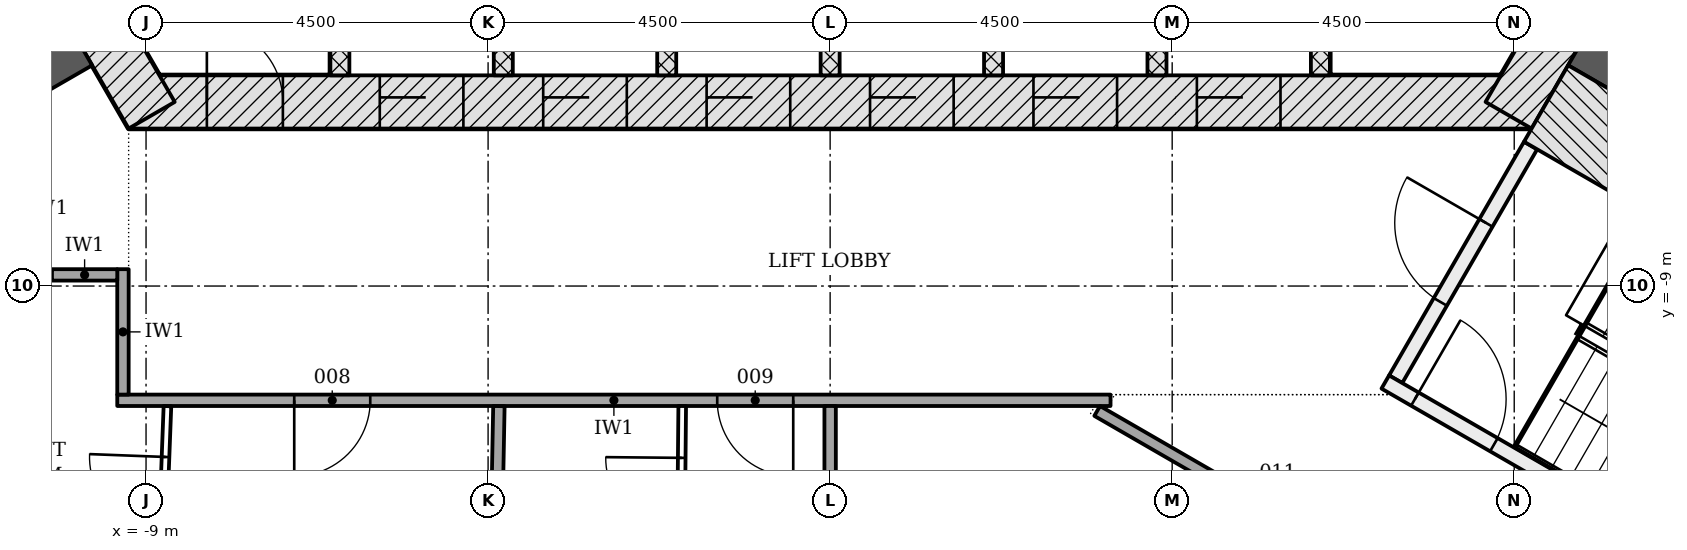
"""IFC4 building model, lengths in metres.
Left out: names, types, materials, properties, quantities, classifications, styles, units other than length and angle.
Written with IfcOpenShell. Run it as: python <this file> out.ifc"""

import sys

from ifc_helpers import new_model, si_unit, direction, frame, frame_2d, origin, place, context, subcontext, project, spatial, rectangle, extrude, element, fill, save


model = new_model("IFC4")
c1 = context("Model", 3, precision=1e-05, world=origin(), true_north=direction((0.0, 1.0)))
c2 = subcontext(c1, "Body", "Model", "MODEL_VIEW")
j1 = project(units=[si_unit("LENGTHUNIT", "METRE"), si_unit("PLANEANGLEUNIT", "RADIAN")], contexts=[c1])
p1 = place(None, origin())
s1 = spatial("IfcSite", under=j1, at=p1, CompositionType="ELEMENT")
p2 = place(p1, origin())
s2 = spatial("IfcBuilding", under=s1, at=p2, CompositionType="ELEMENT")
p3 = place(p2, frame((0.0, 0.0, 45.6)))
s3 = spatial("IfcBuildingStorey", under=s2, at=p3, CompositionType="ELEMENT", Elevation=45.6)
p4 = place(p3, frame((-9.229, -6.578, -0.2), z_axis=(0.0, 0.0, 1.0), x_axis=(1.0, 0.0, 0.0)))
e1 = element("IfcWall", 1, at=p4, inside=s3, PredefinedType="SHEAR", context=c2, shape_type="SweptSolid", body=[
    extrude(rectangle(XDim=18.458, YDim=0.7, at=frame_2d((9.229, 0.0))), origin(), (0.0, 0.0, 1.0), 3.6),
])
p5 = place(p4, frame((3.304, 0.0, 0.2)))
e2 = element("IfcOpeningElement", 2, at=p5, cuts=e1, PredefinedType="OPENING", context=c2, shape_type="SweptSolid", body=[
    extrude(rectangle(XDim=1.1, YDim=2.1, at=frame_2d((0.55, 1.05))), frame((0.0, 0.36, 0.0), z_axis=(0.0, -1.0, 0.0), x_axis=(1.0, 0.0, 0.0)), (0.0, 0.0, 1.0), 0.72),
])
p6 = place(p4, frame((5.454, 0.0, 0.2)))
e3 = element("IfcOpeningElement", 3, at=p6, cuts=e1, PredefinedType="OPENING", context=c2, shape_type="SweptSolid", body=[
    extrude(rectangle(XDim=1.1, YDim=2.1, at=frame_2d((0.55, 1.05))), frame((0.0, 0.36, 0.0), z_axis=(0.0, -1.0, 0.0), x_axis=(1.0, 0.0, 0.0)), (0.0, 0.0, 1.0), 0.72),
])
p7 = place(p4, frame((7.604, 0.0, 0.2)))
e4 = element("IfcOpeningElement", 4, at=p7, cuts=e1, PredefinedType="OPENING", context=c2, shape_type="SweptSolid", body=[
    extrude(rectangle(XDim=1.1, YDim=2.1, at=frame_2d((0.55, 1.05))), frame((0.0, 0.36, 0.0), z_axis=(0.0, -1.0, 0.0), x_axis=(1.0, 0.0, 0.0)), (0.0, 0.0, 1.0), 0.72),
])
p8 = place(p4, frame((9.754, 0.0, 0.2)))
e5 = element("IfcOpeningElement", 5, at=p8, cuts=e1, PredefinedType="OPENING", context=c2, shape_type="SweptSolid", body=[
    extrude(rectangle(XDim=1.1, YDim=2.1, at=frame_2d((0.55, 1.05))), frame((0.0, 0.36, 0.0), z_axis=(0.0, -1.0, 0.0), x_axis=(1.0, 0.0, 0.0)), (0.0, 0.0, 1.0), 0.72),
])
p9 = place(p4, frame((11.904, 0.0, 0.2)))
e6 = element("IfcOpeningElement", 6, at=p9, cuts=e1, PredefinedType="OPENING", context=c2, shape_type="SweptSolid", body=[
    extrude(rectangle(XDim=1.1, YDim=2.1, at=frame_2d((0.55, 1.05))), frame((0.0, 0.36, 0.0), z_axis=(0.0, -1.0, 0.0), x_axis=(1.0, 0.0, 0.0)), (0.0, 0.0, 1.0), 0.72),
])
p10 = place(p4, frame((14.054, 0.0, 0.2)))
e7 = element("IfcOpeningElement", 7, at=p10, cuts=e1, PredefinedType="OPENING", context=c2, shape_type="SweptSolid", body=[
    extrude(rectangle(XDim=1.1, YDim=2.1, at=frame_2d((0.55, 1.05))), frame((0.0, 0.36, 0.0), z_axis=(0.0, -1.0, 0.0), x_axis=(1.0, 0.0, 0.0)), (0.0, 0.0, 1.0), 0.72),
])
p11 = place(p4, frame((1.029, 0.0, 0.2)))
e8 = element("IfcOpeningElement", 8, at=p11, cuts=e1, PredefinedType="OPENING", context=c2, shape_type="SweptSolid", body=[
    extrude(rectangle(XDim=1.0, YDim=2.1, at=frame_2d((0.5, 1.05))), frame((0.0, 0.36, 0.0), z_axis=(0.0, -1.0, 0.0), x_axis=(1.0, 0.0, 0.0)), (0.0, 0.0, 1.0), 0.72),
])
for number, where, z_axis, x_axis in (
    (9, (8.926, -6.753, -0.2), (0.0, 0.0, 1.0), (0.5, 0.866, 0.0)),
    (10, (-10.311, -4.353, -0.2), (0.0, 0.0, 1.0), (0.5, -0.866, 0.0)),
):
    element("IfcWall", number, at=place(p3, frame(where, z_axis=z_axis, x_axis=x_axis)), inside=s3, PredefinedType="SHEAR", context=c2, shape_type="SweptSolid", body=[
        extrude(rectangle(XDim=2.771, YDim=0.7, at=frame_2d((1.386, 0.0))), origin(), (0.0, 0.0, 1.0), 3.6),
    ])
for number, where, z_axis, x_axis in (
    (11, (-9.922, -5.728, -0.2), (0.0, 0.0, 1.0), (-0.866, -0.5, 0.0)),
    (12, (9.922, -5.728, -0.2), (0.0, 0.0, 1.0), (0.866, -0.5, 0.0)),
):
    element("IfcWall", number, at=place(p3, frame(where, z_axis=z_axis, x_axis=x_axis)), inside=s3, PredefinedType="SHEAR", context=c2, shape_type="SweptSolid", body=[
        extrude(rectangle(XDim=14.013, YDim=0.85, at=frame_2d((7.007, 0.0))), origin(), (0.0, 0.0, 1.0), 3.6),
    ])
for number, where, z_axis, x_axis in (
    (13, (-6.45, -6.228, -0.2), (0.0, 0.0, 1.0), (0.0, 1.0, 0.0)),
    (14, (-4.3, -6.228, -0.2), (0.0, 0.0, 1.0), (0.0, 1.0, 0.0)),
    (15, (-2.15, -6.228, -0.2), (0.0, 0.0, 1.0), (0.0, 1.0, 0.0)),
    (16, (0.0, -6.228, -0.2), (0.0, 0.0, 1.0), (0.0, 1.0, 0.0)),
    (17, (2.15, -6.228, -0.2), (0.0, 0.0, 1.0), (0.0, 1.0, 0.0)),
    (18, (4.3, -6.228, -0.2), (0.0, 0.0, 1.0), (0.0, 1.0, 0.0)),
    (19, (6.45, -6.228, -0.2), (0.0, 0.0, 1.0), (0.0, 1.0, 0.0)),
):
    element("IfcWall", number, at=place(p3, frame(where, z_axis=z_axis, x_axis=x_axis)), inside=s3, PredefinedType="PARTITIONING", context=c2, shape_type="SweptSolid", body=[
        extrude(rectangle(XDim=2.5, YDim=0.25, at=frame_2d((1.25, 0.0))), origin(), (0.0, 0.0, 1.0), 3.6),
    ])
p12 = place(p3, frame((-10.424, -4.858, -0.2), z_axis=(0.0, 0.0, 1.0), x_axis=(-0.866033125095, -0.499986626058, 0.0)))
e20 = element("IfcWall", 20, at=p12, inside=s3, PredefinedType="SHEAR", context=c2, shape_type="SweptSolid", body=[
    extrude(rectangle(XDim=7.2, YDim=1.161, at=frame_2d((3.6, 0.0))), origin(), (0.0, 0.0, 1.0), 3.6),
])
p13 = place(p3, frame((7.44, -10.226, -0.2), z_axis=(0.0, 0.0, 1.0), x_axis=(0.500022077904, 0.866012656725, 0.0)))
e21 = element("IfcWall", 21, at=p13, inside=s3, PredefinedType="SHEAR", context=c2, shape_type="SweptSolid", body=[
    extrude(rectangle(XDim=3.55, YDim=0.2, at=frame_2d((1.775, 0.0))), origin(), (0.0, 0.0, 1.0), 3.6),
])
p14 = place(p13, frame((1.175, 0.0, 0.2)))
e22 = element("IfcOpeningElement", 22, at=p14, cuts=e21, PredefinedType="OPENING", context=c2, shape_type="SweptSolid", body=[
    extrude(rectangle(XDim=1.2, YDim=2.1, at=frame_2d((0.6, 1.05))), frame((0.0, 0.11, 0.0), z_axis=(0.0, -1.0, 0.0), x_axis=(1.0, 0.0, 0.0)), (0.0, 0.0, 1.0), 0.22),
])
p15 = place(p3, frame((7.304, -10.262, -0.2), z_axis=(0.0, 0.0, 1.0), x_axis=(0.866026594901, -0.49999793692, 0.0)))
e23 = element("IfcWall", 23, at=p15, inside=s3, PredefinedType="SHEAR", context=c2, shape_type="SweptSolid", body=[
    extrude(rectangle(XDim=5.6, YDim=0.2, at=frame_2d((2.8, 0.0))), origin(), (0.0, 0.0, 1.0), 3.6),
])
p16 = place(p15, frame((0.45, 0.0, 0.2)))
e24 = element("IfcOpeningElement", 24, at=p16, cuts=e23, PredefinedType="OPENING", context=c2, shape_type="SweptSolid", body=[
    extrude(rectangle(XDim=1.2, YDim=2.1, at=frame_2d((0.6, 1.05))), frame((0.0, 0.11, 0.0), z_axis=(0.0, -1.0, 0.0), x_axis=(1.0, 0.0, 0.0)), (0.0, 0.0, 1.0), 0.22),
])
p17 = place(p3, frame((9.419, -6.599, -0.2), z_axis=(0.0, 0.0, 1.0), x_axis=(0.866033125095, -0.499986626058, 0.0)))
e25 = element("IfcWall", 25, at=p17, inside=s3, PredefinedType="SHEAR", context=c2, shape_type="SweptSolid", body=[
    extrude(rectangle(XDim=7.2, YDim=1.161, at=frame_2d((3.6, 0.0))), origin(), (0.0, 0.0, 1.0), 3.6),
])
p18 = place(p3, frame((3.689, -10.503, 0.0), z_axis=(0.0, 0.0, 1.0), x_axis=(-1.0, 0.0, 0.0)))
e26 = element("IfcWall", 26, at=p18, inside=s3, PredefinedType="PARTITIONING", context=c2, shape_type="SweptSolid", body=[
    extrude(rectangle(XDim=13.068, YDim=0.15, at=frame_2d((6.534, 0.0))), origin(), (0.0, 0.0, 1.0), 2.778),
])
p19 = place(p18, frame((9.74, 0.0, 0.0)))
e27 = element("IfcOpeningElement", 27, at=p19, cuts=e26, PredefinedType="OPENING", context=c2, shape_type="SweptSolid", body=[
    extrude(rectangle(XDim=1.0, YDim=2.1, at=frame_2d((0.5, 1.05))), frame((0.0, 0.085, 0.0), z_axis=(0.0, -1.0, 0.0), x_axis=(1.0, 0.0, 0.0)), (0.0, 0.0, 1.0), 0.17),
])
p20 = place(p18, frame((4.175, 0.0, 0.0)))
e28 = element("IfcOpeningElement", 28, at=p20, cuts=e26, PredefinedType="OPENING", context=c2, shape_type="SweptSolid", body=[
    extrude(rectangle(XDim=1.0, YDim=2.1, at=frame_2d((0.5, 1.05))), frame((0.0, 0.085, 0.0), z_axis=(0.0, -1.0, 0.0), x_axis=(1.0, 0.0, 0.0)), (0.0, 0.0, 1.0), 0.17),
])
p21 = place(p3, frame((8.616, -13.589, 0.0), z_axis=(0.0, 0.0, 1.0), x_axis=(-0.866039313704, 0.499975906538, 0.0)))
e29 = element("IfcWall", 29, at=p21, inside=s3, PredefinedType="PARTITIONING", context=c2, shape_type="SweptSolid", body=[
    extrude(rectangle(XDim=5.892, YDim=0.15, at=frame_2d((2.946, 0.0))), origin(), (0.0, 0.0, 1.0), 2.778),
])
p22 = place(p21, frame((2.649, 0.0, 0.0)))
e30 = element("IfcOpeningElement", 30, at=p22, cuts=e29, PredefinedType="OPENING", context=c2, shape_type="SweptSolid", body=[
    extrude(rectangle(XDim=1.0, YDim=2.1, at=frame_2d((0.5, 1.05))), frame((0.0, 0.085, 0.0), z_axis=(0.0, -1.0, 0.0), x_axis=(1.0, 0.0, 0.0)), (0.0, 0.0, 1.0), 0.17),
])
p23 = place(p3, frame((-9.304, -10.428, 0.0), z_axis=(0.0, 0.0, 1.0), x_axis=(0.0, 1.0, 0.0)))
e31 = element("IfcWall", 31, at=p23, inside=s3, PredefinedType="PARTITIONING", context=c2, shape_type="SweptSolid", body=[
    extrude(rectangle(XDim=1.65, YDim=0.15, at=frame_2d((0.825, 0.0))), origin(), (0.0, 0.0, 1.0), 3.4),
])
p24 = place(p3, frame((-10.238, -8.853, 0.0), z_axis=(0.0, 0.0, 1.0), x_axis=(1.0, 0.0, 0.0)))
e32 = element("IfcWall", 32, at=p24, inside=s3, PredefinedType="PARTITIONING", context=c2, shape_type="SweptSolid", body=[
    extrude(rectangle(XDim=0.859, YDim=0.15, at=frame_2d((0.43, 0.0))), origin(), (0.0, 0.0, 1.0), 3.4),
])
p25 = place(p3, frame((0.0, -17.331, 0.0), z_axis=(0.0, 0.0, 1.0), x_axis=(0.0, 1.0, 0.0)))
e33 = element("IfcWall", 33, at=p25, inside=s3, PredefinedType="PARTITIONING", context=c2, shape_type="SweptSolid", body=[
    extrude(rectangle(XDim=6.753, YDim=0.15, at=frame_2d((3.376, 0.0))), origin(), (0.0, 0.0, 1.0), 2.778),
])
p26 = place(p3, frame((-4.485, -17.289, 0.0), z_axis=(0.0, 0.0, 1.0), x_axis=(0.018918777789, 0.999821023907, 0.0)))
e34 = element("IfcWall", 34, at=p26, inside=s3, PredefinedType="PARTITIONING", context=c2, shape_type="SweptSolid", body=[
    extrude(rectangle(XDim=6.71, YDim=0.15, at=frame_2d((3.355, 0.0))), origin(), (0.0, 0.0, 1.0), 2.778),
])
p27 = place(p3, frame((-8.968, -17.162, 0.0), z_axis=(0.0, 0.0, 1.0), x_axis=(0.037809580141, 0.999284962185, 0.0)))
e35 = element("IfcWall", 35, at=p27, inside=s3, PredefinedType="PARTITIONING", context=c2, shape_type="SweptSolid", body=[
    extrude(rectangle(XDim=6.586, YDim=0.1, at=frame_2d((3.293, 0.0))), origin(), (0.0, 0.0, 1.0), 2.778),
])
p28 = place(p27, frame((4.917, 0.0, 0.0)))
e36 = element("IfcOpeningElement", 36, at=p28, cuts=e35, PredefinedType="OPENING", context=c2, shape_type="SweptSolid", body=[
    extrude(rectangle(XDim=1.0, YDim=2.1, at=frame_2d((0.5, 1.05))), frame((0.0, 0.06, 0.0), z_axis=(0.0, -1.0, 0.0), x_axis=(1.0, 0.0, 0.0)), (0.0, 0.0, 1.0), 0.12),
])
p29 = place(p27, frame((1.635, 0.0, 0.0)))
e37 = element("IfcOpeningElement", 37, at=p29, cuts=e35, PredefinedType="OPENING", context=c2, shape_type="SweptSolid", body=[
    extrude(rectangle(XDim=1.0, YDim=2.1, at=frame_2d((0.5, 1.05))), frame((0.0, 0.06, 0.0), z_axis=(0.0, -1.0, 0.0), x_axis=(1.0, 0.0, 0.0)), (0.0, 0.0, 1.0), 0.12),
])
p30 = place(p3, frame((-1.969, -12.96, 0.0), z_axis=(0.0, 0.0, 1.0), x_axis=(0.009429675035, 0.999955539626, 0.0)))
e38 = element("IfcWall", 38, at=p30, inside=s3, PredefinedType="PARTITIONING", context=c2, shape_type="SweptSolid", body=[
    extrude(rectangle(XDim=2.382, YDim=0.1, at=frame_2d((1.191, 0.0))), origin(), (0.0, 0.0, 1.0), 3.4),
])
p31 = place(p30, frame((0.7, 0.0, 0.0)))
e39 = element("IfcOpeningElement", 39, at=p31, cuts=e38, PredefinedType="OPENING", context=c2, shape_type="SweptSolid", body=[
    extrude(rectangle(XDim=1.0, YDim=2.1, at=frame_2d((0.5, 1.05))), frame((0.0, 0.06, 0.0), z_axis=(0.0, -1.0, 0.0), x_axis=(1.0, 0.0, 0.0)), (0.0, 0.0, 1.0), 0.12),
])
p32 = place(p5, origin())
e40 = element("IfcDoor", 40, at=p32, inside=s3, OperationType="DOUBLE_DOOR_SLIDING", PredefinedType="DOOR", context=c2, shape_type="SweptSolid", body=[
    extrude(rectangle(XDim=1.1, YDim=2.1, at=frame_2d((0.55, 1.05))), frame((0.0, 0.025, 0.0), z_axis=(0.0, -1.0, 0.0), x_axis=(1.0, 0.0, 0.0)), (0.0, 0.0, 1.0), 0.05),
])
fill(e2, e40)
p33 = place(p6, origin())
e41 = element("IfcDoor", 41, at=p33, inside=s3, OperationType="DOUBLE_DOOR_SLIDING", PredefinedType="DOOR", context=c2, shape_type="SweptSolid", body=[
    extrude(rectangle(XDim=1.1, YDim=2.1, at=frame_2d((0.55, 1.05))), frame((0.0, 0.025, 0.0), z_axis=(0.0, -1.0, 0.0), x_axis=(1.0, 0.0, 0.0)), (0.0, 0.0, 1.0), 0.05),
])
fill(e3, e41)
p34 = place(p7, origin())
e42 = element("IfcDoor", 42, at=p34, inside=s3, OperationType="DOUBLE_DOOR_SLIDING", PredefinedType="DOOR", context=c2, shape_type="SweptSolid", body=[
    extrude(rectangle(XDim=1.1, YDim=2.1, at=frame_2d((0.55, 1.05))), frame((0.0, 0.025, 0.0), z_axis=(0.0, -1.0, 0.0), x_axis=(1.0, 0.0, 0.0)), (0.0, 0.0, 1.0), 0.05),
])
fill(e4, e42)
p35 = place(p8, origin())
e43 = element("IfcDoor", 43, at=p35, inside=s3, OperationType="DOUBLE_DOOR_SLIDING", PredefinedType="DOOR", context=c2, shape_type="SweptSolid", body=[
    extrude(rectangle(XDim=1.1, YDim=2.1, at=frame_2d((0.55, 1.05))), frame((0.0, 0.025, 0.0), z_axis=(0.0, -1.0, 0.0), x_axis=(1.0, 0.0, 0.0)), (0.0, 0.0, 1.0), 0.05),
])
fill(e5, e43)
p36 = place(p9, origin())
e44 = element("IfcDoor", 44, at=p36, inside=s3, OperationType="DOUBLE_DOOR_SLIDING", PredefinedType="DOOR", context=c2, shape_type="SweptSolid", body=[
    extrude(rectangle(XDim=1.1, YDim=2.1, at=frame_2d((0.55, 1.05))), frame((0.0, 0.025, 0.0), z_axis=(0.0, -1.0, 0.0), x_axis=(1.0, 0.0, 0.0)), (0.0, 0.0, 1.0), 0.05),
])
fill(e6, e44)
p37 = place(p10, origin())
e45 = element("IfcDoor", 45, at=p37, inside=s3, OperationType="DOUBLE_DOOR_SLIDING", PredefinedType="DOOR", context=c2, shape_type="SweptSolid", body=[
    extrude(rectangle(XDim=1.1, YDim=2.1, at=frame_2d((0.55, 1.05))), frame((0.0, 0.025, 0.0), z_axis=(0.0, -1.0, 0.0), x_axis=(1.0, 0.0, 0.0)), (0.0, 0.0, 1.0), 0.05),
])
fill(e7, e45)
p38 = place(p11, origin())
e46 = element("IfcDoor", 46, at=p38, inside=s3, OperationType="SINGLE_SWING_LEFT", PredefinedType="DOOR", context=c2, shape_type="SweptSolid", body=[
    extrude(rectangle(XDim=1.0, YDim=2.1, at=frame_2d((0.5, 1.05))), frame((0.0, 0.075, 0.0), z_axis=(0.0, -1.0, 0.0), x_axis=(1.0, 0.0, 0.0)), (0.0, 0.0, 1.0), 0.15),
])
fill(e8, e46)
p39 = place(p14, origin())
e47 = element("IfcDoor", 47, at=p39, inside=s3, OperationType="SINGLE_SWING_RIGHT", PredefinedType="DOOR", context=c2, shape_type="SweptSolid", body=[
    extrude(rectangle(XDim=1.2, YDim=2.1, at=frame_2d((0.6, 1.05))), frame((0.0, 0.025, 0.0), z_axis=(0.0, -1.0, 0.0), x_axis=(1.0, 0.0, 0.0)), (0.0, 0.0, 1.0), 0.05),
])
fill(e22, e47)
p40 = place(p16, origin())
e48 = element("IfcDoor", 48, at=p40, inside=s3, OperationType="SINGLE_SWING_LEFT", PredefinedType="DOOR", context=c2, shape_type="SweptSolid", body=[
    extrude(rectangle(XDim=1.2, YDim=2.1, at=frame_2d((0.6, 1.05))), frame((0.0, 0.025, 0.0), z_axis=(0.0, -1.0, 0.0), x_axis=(1.0, 0.0, 0.0)), (0.0, 0.0, 1.0), 0.05),
])
fill(e24, e48)
p41 = place(p19, origin())
e49 = element("IfcDoor", 49, at=p41, inside=s3, OperationType="SINGLE_SWING_RIGHT", PredefinedType="DOOR", context=c2, shape_type="SweptSolid", body=[
    extrude(rectangle(XDim=1.0, YDim=2.1, at=frame_2d((0.5, 1.05))), frame((0.0, 0.025, 0.0), z_axis=(0.0, -1.0, 0.0), x_axis=(1.0, 0.0, 0.0)), (0.0, 0.0, 1.0), 0.05),
])
fill(e27, e49)
p42 = place(p20, origin())
e50 = element("IfcDoor", 50, at=p42, inside=s3, OperationType="SINGLE_SWING_LEFT", PredefinedType="DOOR", context=c2, shape_type="SweptSolid", body=[
    extrude(rectangle(XDim=1.0, YDim=2.1, at=frame_2d((0.5, 1.05))), frame((0.0, 0.025, 0.0), z_axis=(0.0, -1.0, 0.0), x_axis=(1.0, 0.0, 0.0)), (0.0, 0.0, 1.0), 0.05),
])
fill(e28, e50)
p43 = place(p28, origin())
e51 = element("IfcDoor", 51, at=p43, inside=s3, OperationType="SINGLE_SWING_RIGHT", PredefinedType="DOOR", context=c2, shape_type="SweptSolid", body=[
    extrude(rectangle(XDim=1.0, YDim=2.1, at=frame_2d((0.5, 1.05))), frame((0.0, 0.025, 0.0), z_axis=(0.0, -1.0, 0.0), x_axis=(1.0, 0.0, 0.0)), (0.0, 0.0, 1.0), 0.05),
])
fill(e36, e51)
p44 = place(p31, origin())
e52 = element("IfcDoor", 52, at=p44, inside=s3, OperationType="SINGLE_SWING_RIGHT", PredefinedType="DOOR", context=c2, shape_type="SweptSolid", body=[
    extrude(rectangle(XDim=1.0, YDim=2.1, at=frame_2d((0.5, 1.05))), frame((0.0, 0.025, 0.0), z_axis=(0.0, -1.0, 0.0), x_axis=(1.0, 0.0, 0.0)), (0.0, 0.0, 1.0), 0.05),
])
fill(e39, e52)
save(model, sys.argv[1])
